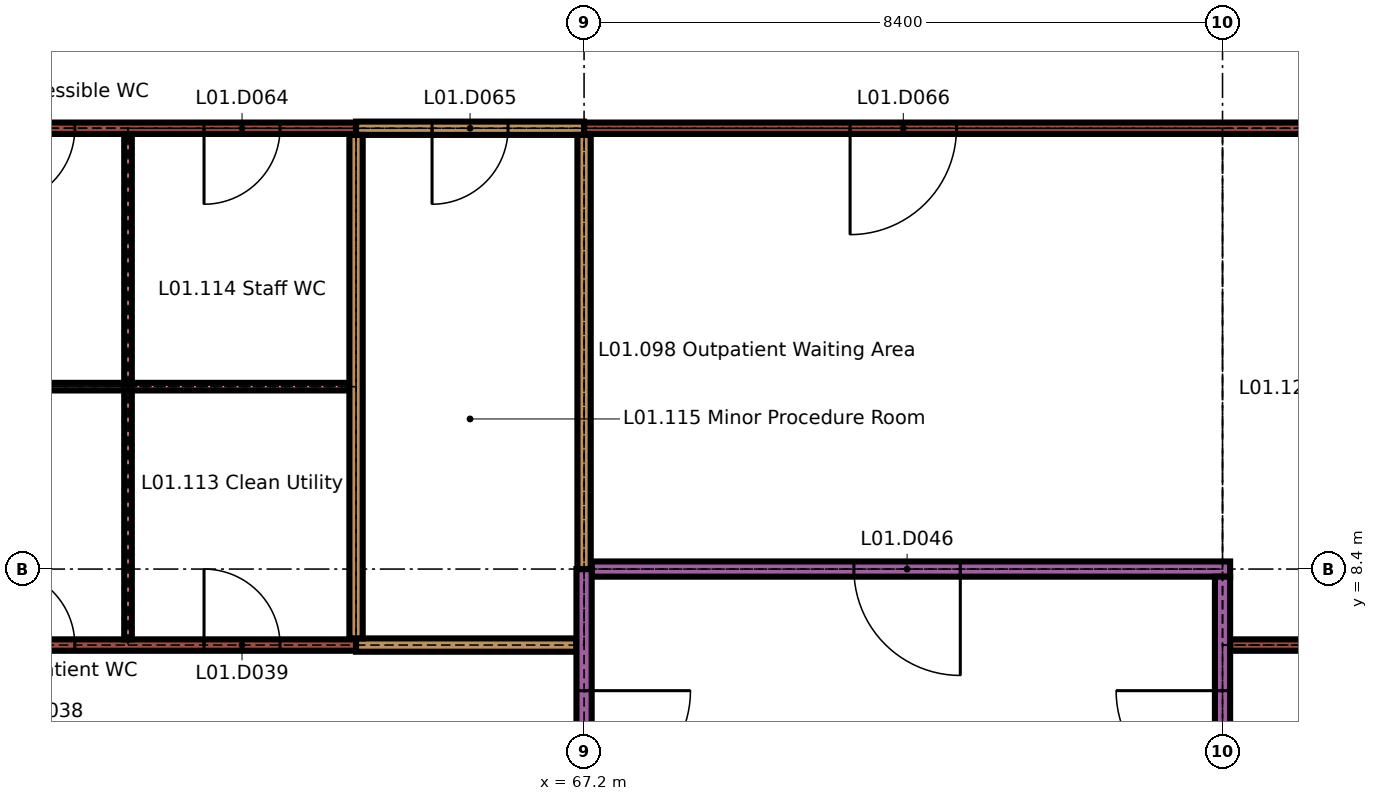
"""IFC4 building model, lengths in metres.
Left out: names, types, materials, properties, quantities, classifications, styles, units other than length and angle.
Written with IfcOpenShell. Run it as: python <this file> out.ifc"""

import sys

from ifc_helpers import new_model, si_unit, direction, frame, frame_2d, origin, place, context, subcontext, project, spatial, rectangle, extrude, element, fill, save


model = new_model("IFC4")
c1 = context("Model", 3, precision=1e-05, world=origin(), true_north=direction((0.0, 1.0)))
c2 = subcontext(c1, "Body", "Model", "MODEL_VIEW")
j1 = project(units=[si_unit("LENGTHUNIT", "METRE"), si_unit("PLANEANGLEUNIT", "RADIAN")], contexts=[c1])
p1 = place(None, origin())
s1 = spatial("IfcSite", under=j1, at=p1, CompositionType="ELEMENT")
p2 = place(p1, origin())
s2 = spatial("IfcBuilding", under=s1, at=p2, CompositionType="ELEMENT")
p3 = place(p2, frame((0.0, 0.0, 4.5)))
s3 = spatial("IfcBuildingStorey", under=s2, at=p3, CompositionType="ELEMENT", Elevation=4.5)
p4 = place(p3, frame((58.8, 7.4, 0.0), z_axis=(0.0, 0.0, 1.0), x_axis=(1.0, 0.0, 0.0)))
e1 = element("IfcWall", 1, at=p4, inside=s3, PredefinedType="PARTITIONING", context=c2, shape_type="SweptSolid", body=[
    extrude(rectangle(XDim=5.4, YDim=0.15, at=frame_2d((2.7, 0.0))), origin(), (0.0, 0.0, 1.0), 3.45),
])
p5 = place(p4, frame((0.7, 0.0, 0.0)))
e2 = element("IfcOpeningElement", 2, at=p5, cuts=e1, PredefinedType="OPENING", context=c2, shape_type="SweptSolid", body=[
    extrude(rectangle(XDim=1.0, YDim=2.1, at=frame_2d((0.5, 1.05))), frame((0.0, 0.085, 0.0), z_axis=(0.0, -1.0, 0.0), x_axis=(1.0, 0.0, 0.0)), (0.0, 0.0, 1.0), 0.17),
])
p6 = place(p4, frame((3.4, 0.0, 0.0)))
e3 = element("IfcOpeningElement", 3, at=p6, cuts=e1, PredefinedType="OPENING", context=c2, shape_type="SweptSolid", body=[
    extrude(rectangle(XDim=1.0, YDim=2.1, at=frame_2d((0.5, 1.05))), frame((0.0, 0.085, 0.0), z_axis=(0.0, -1.0, 0.0), x_axis=(1.0, 0.0, 0.0)), (0.0, 0.0, 1.0), 0.17),
])
p7 = place(p3, frame((64.2, 7.4, 0.0), z_axis=(0.0, 0.0, 1.0), x_axis=(1.0, 0.0, 0.0)))
e4 = element("IfcWall", 4, at=p7, inside=s3, PredefinedType="PARTITIONING", context=c2, shape_type="SweptSolid", body=[
    extrude(rectangle(XDim=2.9, YDim=0.175, at=frame_2d((1.45, 0.0))), origin(), (0.0, 0.0, 1.0), 3.45),
])
p8 = place(p3, frame((75.7, 7.4, 0.0), z_axis=(0.0, 0.0, 1.0), x_axis=(1.0, 0.0, 0.0)))
e5 = element("IfcWall", 5, at=p8, inside=s3, PredefinedType="PARTITIONING", context=c2, shape_type="SweptSolid", body=[
    extrude(rectangle(XDim=11.1, YDim=0.15, at=frame_2d((5.55, 0.0))), origin(), (0.0, 0.0, 1.0), 3.45),
])
p9 = place(p8, frame((3.45, 0.0, 0.0)))
e6 = element("IfcOpeningElement", 6, at=p9, cuts=e5, PredefinedType="OPENING", context=c2, shape_type="SweptSolid", body=[
    extrude(rectangle(XDim=1.4, YDim=2.1, at=frame_2d((0.7, 1.05))), frame((0.0, 0.085, 0.0), z_axis=(0.0, -1.0, 0.0), x_axis=(1.0, 0.0, 0.0)), (0.0, 0.0, 1.0), 0.17),
])
p10 = place(p3, frame((67.3, 8.4, 0.0), z_axis=(0.0, 0.0, 1.0), x_axis=(1.0, 0.0, 0.0)))
e7 = element("IfcWall", 7, at=p10, inside=s3, PredefinedType="PARTITIONING", context=c2, shape_type="SweptSolid", body=[
    extrude(rectangle(XDim=8.4, YDim=0.2, at=frame_2d((4.2, 0.0))), origin(), (0.0, 0.0, 1.0), 3.45),
])
p11 = place(p10, frame((3.45, 0.0, 0.0)))
e8 = element("IfcOpeningElement", 8, at=p11, cuts=e7, PredefinedType="OPENING", context=c2, shape_type="SweptSolid", body=[
    extrude(rectangle(XDim=1.4, YDim=2.1, at=frame_2d((0.7, 1.05))), frame((0.0, 0.11, 0.0), z_axis=(0.0, -1.0, 0.0), x_axis=(1.0, 0.0, 0.0)), (0.0, 0.0, 1.0), 0.22),
])
p12 = place(p3, frame((58.887, 10.8, 0.0), z_axis=(0.0, 0.0, 1.0), x_axis=(1.0, 0.0, 0.0)))
e9 = element("IfcWall", 9, at=p12, inside=s3, PredefinedType="PARTITIONING", context=c2, shape_type="SweptSolid", body=[
    extrude(rectangle(XDim=5.225, YDim=0.1, at=frame_2d((2.613, 0.0))), origin(), (0.0, 0.0, 1.0), 3.45),
])
p13 = place(p3, frame((58.8, 14.2, 0.0), z_axis=(0.0, 0.0, 1.0), x_axis=(1.0, 0.0, 0.0)))
e10 = element("IfcWall", 10, at=p13, inside=s3, PredefinedType="PARTITIONING", context=c2, shape_type="SweptSolid", body=[
    extrude(rectangle(XDim=5.4, YDim=0.15, at=frame_2d((2.7, 0.0))), origin(), (0.0, 0.0, 1.0), 3.45),
])
p14 = place(p13, frame((0.7, 0.0, 0.0)))
e11 = element("IfcOpeningElement", 11, at=p14, cuts=e10, PredefinedType="OPENING", context=c2, shape_type="SweptSolid", body=[
    extrude(rectangle(XDim=1.0, YDim=2.1, at=frame_2d((0.5, 1.05))), frame((0.0, 0.085, 0.0), z_axis=(0.0, -1.0, 0.0), x_axis=(1.0, 0.0, 0.0)), (0.0, 0.0, 1.0), 0.17),
])
p15 = place(p13, frame((3.4, 0.0, 0.0)))
e12 = element("IfcOpeningElement", 12, at=p15, cuts=e10, PredefinedType="OPENING", context=c2, shape_type="SweptSolid", body=[
    extrude(rectangle(XDim=1.0, YDim=2.1, at=frame_2d((0.5, 1.05))), frame((0.0, 0.085, 0.0), z_axis=(0.0, -1.0, 0.0), x_axis=(1.0, 0.0, 0.0)), (0.0, 0.0, 1.0), 0.17),
])
p16 = place(p3, frame((64.2, 14.2, 0.0), z_axis=(0.0, 0.0, 1.0), x_axis=(1.0, 0.0, 0.0)))
e13 = element("IfcWall", 13, at=p16, inside=s3, PredefinedType="PARTITIONING", context=c2, shape_type="SweptSolid", body=[
    extrude(rectangle(XDim=3.0, YDim=0.175, at=frame_2d((1.5, 0.0))), origin(), (0.0, 0.0, 1.0), 3.45),
])
p17 = place(p16, frame((1.0, 0.0, 0.0)))
e14 = element("IfcOpeningElement", 14, at=p17, cuts=e13, PredefinedType="OPENING", context=c2, shape_type="SweptSolid", body=[
    extrude(rectangle(XDim=1.0, YDim=2.1, at=frame_2d((0.5, 1.05))), frame((0.0, 0.097, 0.0), z_axis=(0.0, -1.0, 0.0), x_axis=(1.0, 0.0, 0.0)), (0.0, 0.0, 1.0), 0.195),
])
p18 = place(p3, frame((67.2, 14.2, 0.0), z_axis=(0.0, 0.0, 1.0), x_axis=(1.0, 0.0, 0.0)))
e15 = element("IfcWall", 15, at=p18, inside=s3, PredefinedType="PARTITIONING", context=c2, shape_type="SweptSolid", body=[
    extrude(rectangle(XDim=19.6, YDim=0.15, at=frame_2d((9.8, 0.0))), origin(), (0.0, 0.0, 1.0), 3.45),
])
p19 = place(p18, frame((3.5, 0.0, 0.0)))
e16 = element("IfcOpeningElement", 16, at=p19, cuts=e15, PredefinedType="OPENING", context=c2, shape_type="SweptSolid", body=[
    extrude(rectangle(XDim=1.4, YDim=2.1, at=frame_2d((0.7, 1.05))), frame((0.0, 0.085, 0.0), z_axis=(0.0, -1.0, 0.0), x_axis=(1.0, 0.0, 0.0)), (0.0, 0.0, 1.0), 0.17),
])
p20 = place(p18, frame((11.9, 0.0, 0.0)))
e17 = element("IfcOpeningElement", 17, at=p20, cuts=e15, PredefinedType="OPENING", context=c2, shape_type="SweptSolid", body=[
    extrude(rectangle(XDim=1.4, YDim=2.1, at=frame_2d((0.7, 1.05))), frame((0.0, 0.085, 0.0), z_axis=(0.0, -1.0, 0.0), x_axis=(1.0, 0.0, 0.0)), (0.0, 0.0, 1.0), 0.17),
])
p21 = place(p18, frame((17.45, 0.0, 0.9)))
e18 = element("IfcOpeningElement", 18, at=p21, cuts=e15, PredefinedType="OPENING", context=c2, shape_type="SweptSolid", body=[
    extrude(rectangle(XDim=1.5, YDim=1.0, at=frame_2d((0.75, 0.5))), frame((0.0, 0.085, 0.0), z_axis=(0.0, -1.0, 0.0), x_axis=(1.0, 0.0, 0.0)), (0.0, 0.0, 1.0), 0.17),
])
for number, where, z_axis, x_axis in (
    (19, (61.2, 7.475, 0.0), (0.0, 0.0, 1.0), (0.0, 1.0, 0.0)),
    (20, (61.2, 10.85, 0.0), (0.0, 0.0, 1.0), (0.0, 1.0, 0.0)),
):
    element("IfcWall", number, at=place(p3, frame(where, z_axis=z_axis, x_axis=x_axis)), inside=s3, PredefinedType="PARTITIONING", context=c2, shape_type="SweptSolid", body=[
        extrude(rectangle(XDim=3.275, YDim=0.1, at=frame_2d((1.637, 0.0))), origin(), (0.0, 0.0, 1.0), 3.45),
    ])
p22 = place(p3, frame((64.2, 7.488, 0.0), z_axis=(0.0, 0.0, 1.0), x_axis=(0.0, 1.0, 0.0)))
e21 = element("IfcWall", 21, at=p22, inside=s3, PredefinedType="PARTITIONING", context=c2, shape_type="SweptSolid", body=[
    extrude(rectangle(XDim=6.625, YDim=0.175, at=frame_2d((3.312, 0.0))), origin(), (0.0, 0.0, 1.0), 3.45),
])
p23 = place(p3, frame((67.2, 3.6, 0.0), z_axis=(0.0, 0.0, 1.0), x_axis=(0.0, 1.0, 0.0)))
e22 = element("IfcWall", 22, at=p23, inside=s3, PredefinedType="PARTITIONING", context=c2, shape_type="SweptSolid", body=[
    extrude(rectangle(XDim=4.8, YDim=0.2, at=frame_2d((2.4, 0.0))), origin(), (0.0, 0.0, 1.0), 3.45),
])
p24 = place(p23, frame((1.8, 0.0, 0.0)))
e23 = element("IfcOpeningElement", 23, at=p24, cuts=e22, PredefinedType="OPENING", context=c2, shape_type="SweptSolid", body=[
    extrude(rectangle(XDim=1.4, YDim=2.1, at=frame_2d((0.7, 1.05))), frame((0.0, 0.11, 0.0), z_axis=(0.0, -1.0, 0.0), x_axis=(1.0, 0.0, 0.0)), (0.0, 0.0, 1.0), 0.22),
])
p25 = place(p3, frame((67.2, 8.4, 0.0), z_axis=(0.0, 0.0, 1.0), x_axis=(0.0, 1.0, 0.0)))
e24 = element("IfcWall", 24, at=p25, inside=s3, PredefinedType="PARTITIONING", context=c2, shape_type="SweptSolid", body=[
    extrude(rectangle(XDim=5.713, YDim=0.175, at=frame_2d((2.856, 0.0))), origin(), (0.0, 0.0, 1.0), 3.45),
])
p26 = place(p3, frame((75.6, 3.6, 0.0), z_axis=(0.0, 0.0, 1.0), x_axis=(0.0, 1.0, 0.0)))
e25 = element("IfcWall", 25, at=p26, inside=s3, PredefinedType="PARTITIONING", context=c2, shape_type="SweptSolid", body=[
    extrude(rectangle(XDim=4.7, YDim=0.2, at=frame_2d((2.35, 0.0))), origin(), (0.0, 0.0, 1.0), 3.45),
])
p27 = place(p26, frame((1.8, 0.0, 0.0)))
e26 = element("IfcOpeningElement", 26, at=p27, cuts=e25, PredefinedType="OPENING", context=c2, shape_type="SweptSolid", body=[
    extrude(rectangle(XDim=1.4, YDim=2.1, at=frame_2d((0.7, 1.05))), frame((0.0, 0.11, 0.0), z_axis=(0.0, -1.0, 0.0), x_axis=(1.0, 0.0, 0.0)), (0.0, 0.0, 1.0), 0.22),
])
p28 = place(p5, origin())
e27 = element("IfcDoor", 27, at=p28, inside=s3, OperationType="SINGLE_SWING_RIGHT", PredefinedType="DOOR", context=c2, shape_type="SweptSolid", body=[
    extrude(rectangle(XDim=1.0, YDim=2.1, at=frame_2d((0.5, 1.05))), frame((0.0, 0.025, 0.0), z_axis=(0.0, -1.0, 0.0), x_axis=(1.0, 0.0, 0.0)), (0.0, 0.0, 1.0), 0.05),
])
fill(e2, e27)
p29 = place(p6, origin())
e28 = element("IfcDoor", 28, at=p29, inside=s3, OperationType="SINGLE_SWING_RIGHT", PredefinedType="DOOR", context=c2, shape_type="SweptSolid", body=[
    extrude(rectangle(XDim=1.0, YDim=2.1, at=frame_2d((0.5, 1.05))), frame((0.0, 0.025, 0.0), z_axis=(0.0, -1.0, 0.0), x_axis=(1.0, 0.0, 0.0)), (0.0, 0.0, 1.0), 0.05),
])
fill(e3, e28)
p30 = place(p11, origin())
e29 = element("IfcDoor", 29, at=p30, inside=s3, OperationType="SINGLE_SWING_RIGHT", PredefinedType="DOOR", context=c2, shape_type="SweptSolid", body=[
    extrude(rectangle(XDim=1.4, YDim=2.1, at=frame_2d((0.7, 1.05))), frame((0.0, 0.025, 0.0), z_axis=(0.0, -1.0, 0.0), x_axis=(1.0, 0.0, 0.0)), (0.0, 0.0, 1.0), 0.05),
])
fill(e8, e29)
p31 = place(p14, origin())
e30 = element("IfcDoor", 30, at=p31, inside=s3, OperationType="SINGLE_SWING_LEFT", PredefinedType="DOOR", context=c2, shape_type="SweptSolid", body=[
    extrude(rectangle(XDim=1.0, YDim=2.1, at=frame_2d((0.5, 1.05))), frame((0.0, 0.025, 0.0), z_axis=(0.0, -1.0, 0.0), x_axis=(1.0, 0.0, 0.0)), (0.0, 0.0, 1.0), 0.05),
])
fill(e11, e30)
p32 = place(p15, origin())
e31 = element("IfcDoor", 31, at=p32, inside=s3, OperationType="SINGLE_SWING_LEFT", PredefinedType="DOOR", context=c2, shape_type="SweptSolid", body=[
    extrude(rectangle(XDim=1.0, YDim=2.1, at=frame_2d((0.5, 1.05))), frame((0.0, 0.025, 0.0), z_axis=(0.0, -1.0, 0.0), x_axis=(1.0, 0.0, 0.0)), (0.0, 0.0, 1.0), 0.05),
])
fill(e12, e31)
p33 = place(p17, origin())
e32 = element("IfcDoor", 32, at=p33, inside=s3, OperationType="SINGLE_SWING_LEFT", PredefinedType="DOOR", context=c2, shape_type="SweptSolid", body=[
    extrude(rectangle(XDim=1.0, YDim=2.1, at=frame_2d((0.5, 1.05))), frame((0.0, 0.035, 0.0), z_axis=(0.0, -1.0, 0.0), x_axis=(1.0, 0.0, 0.0)), (0.0, 0.0, 1.0), 0.07),
])
fill(e14, e32)
p34 = place(p19, origin())
e33 = element("IfcDoor", 33, at=p34, inside=s3, OperationType="SINGLE_SWING_LEFT", PredefinedType="DOOR", context=c2, shape_type="SweptSolid", body=[
    extrude(rectangle(XDim=1.4, YDim=2.1, at=frame_2d((0.7, 1.05))), frame((0.0, 0.025, 0.0), z_axis=(0.0, -1.0, 0.0), x_axis=(1.0, 0.0, 0.0)), (0.0, 0.0, 1.0), 0.05),
])
fill(e16, e33)
p35 = place(p24, origin())
e34 = element("IfcDoor", 34, at=p35, inside=s3, OperationType="SINGLE_SWING_RIGHT", PredefinedType="DOOR", context=c2, shape_type="SweptSolid", body=[
    extrude(rectangle(XDim=1.4, YDim=2.1, at=frame_2d((0.7, 1.05))), frame((0.0, 0.03, 0.0), z_axis=(0.0, -1.0, 0.0), x_axis=(1.0, 0.0, 0.0)), (0.0, 0.0, 1.0), 0.06),
])
fill(e23, e34)
p36 = place(p27, origin())
e35 = element("IfcDoor", 35, at=p36, inside=s3, OperationType="SINGLE_SWING_LEFT", PredefinedType="DOOR", context=c2, shape_type="SweptSolid", body=[
    extrude(rectangle(XDim=1.4, YDim=2.1, at=frame_2d((0.7, 1.05))), frame((0.0, 0.03, 0.0), z_axis=(0.0, -1.0, 0.0), x_axis=(1.0, 0.0, 0.0)), (0.0, 0.0, 1.0), 0.06),
])
fill(e26, e35)
save(model, sys.argv[1])
